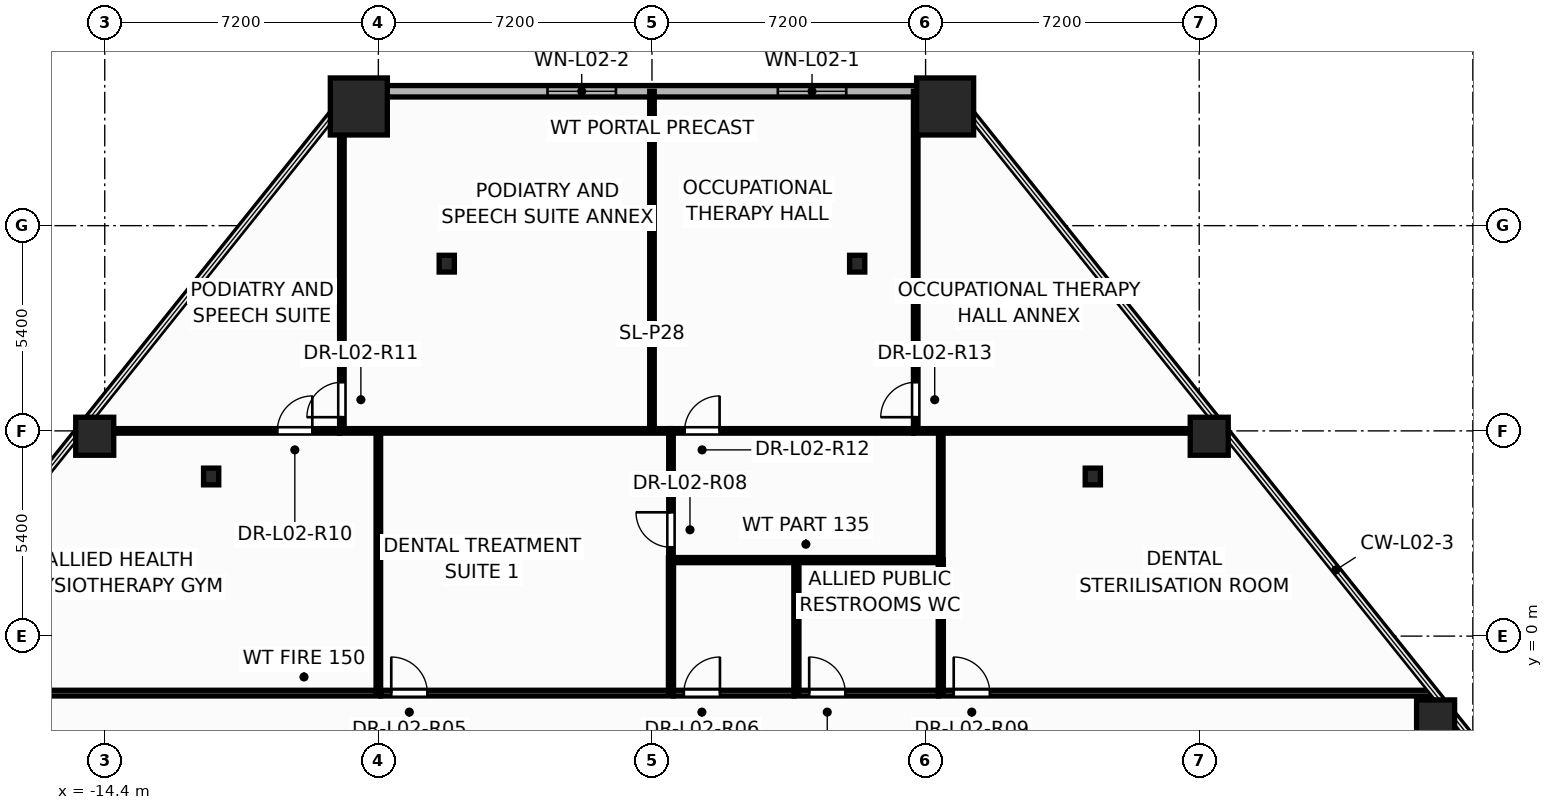
"""IFC4 building model, lengths in metres.
Left out: names, types, materials, properties, quantities, classifications, styles, units other than length and angle.
Written with IfcOpenShell. Run it as: python <this file> out.ifc"""

import sys

from ifc_helpers import new_model, si_unit, direction, frame, frame_2d, origin, origin_2d, place, context, subcontext, project, spatial, rectangle, hollow_rectangle, hollow_circle, i_section, extrude, element, fill, save


model = new_model("IFC4")
c1 = context("Model", 3, precision=1e-05, world=origin(), true_north=direction((0.0, 1.0)))
c2 = subcontext(c1, "Body", "Model", "MODEL_VIEW")
j1 = project(units=[si_unit("LENGTHUNIT", "METRE"), si_unit("PLANEANGLEUNIT", "RADIAN")], contexts=[c1])
p1 = place(None, origin())
s1 = spatial("IfcSite", under=j1, at=p1, CompositionType="ELEMENT")
p2 = place(p1, origin())
s2 = spatial("IfcBuilding", under=s1, at=p2, CompositionType="ELEMENT")
p3 = place(p2, frame((0.0, 0.0, 9.9)))
s3 = spatial("IfcBuildingStorey", under=s2, at=p3, CompositionType="ELEMENT", Elevation=9.9)
for number, where, z_axis, x_axis in (
    (1, (7.714, 13.936, 0.0), (0.0, 0.0, 1.0), (1.0, 0.0, 0.0)),
    (2, (-7.714, 13.936, 0.0), (0.0, 0.0, 1.0), (1.0, 0.0, 0.0)),
):
    element("IfcColumn", number, at=place(p3, frame(where, z_axis=z_axis, x_axis=x_axis)), inside=s3, PredefinedType="COLUMN", context=c2, shape_type="SweptSolid", body=[
        extrude(hollow_rectangle(XDim=1.5, YDim=1.5, WallThickness=0.075, at=origin_2d()), origin(), (0.0, 0.0, 1.0), 4.5),
    ])
for number, where, z_axis, x_axis in (
    (3, (20.62, -2.179, 0.0), (0.0, 0.0, 1.0), (1.0, 0.0, 0.0)),
    (4, (14.664, 5.259, 0.0), (0.0, 0.0, 1.0), (1.0, 0.0, 0.0)),
    (5, (-14.664, 5.259, 0.0), (0.0, 0.0, 1.0), (1.0, 0.0, 0.0)),
):
    element("IfcColumn", number, at=place(p3, frame(where, z_axis=z_axis, x_axis=x_axis)), inside=s3, PredefinedType="COLUMN", context=c2, shape_type="SweptSolid", body=[
        extrude(hollow_circle(Radius=0.5, WallThickness=0.045, at=origin_2d()), origin(), (0.0, 0.0, 1.0), 4.5),
    ])
for number, where, z_axis, x_axis in (
    (6, (-11.6, 4.2, 0.0), (0.0, 0.0, 1.0), (1.0, 0.0, 0.0)),
    (7, (11.6, 4.2, 0.0), (0.0, 0.0, 1.0), (1.0, 0.0, 0.0)),
    (8, (-5.4, 9.8, 0.0), (0.0, 0.0, 1.0), (1.0, 0.0, 0.0)),
    (9, (5.4, 9.8, 0.0), (0.0, 0.0, 1.0), (1.0, 0.0, 0.0)),
):
    element("IfcColumn", number, at=place(p3, frame(where, z_axis=z_axis, x_axis=x_axis)), inside=s3, PredefinedType="COLUMN", context=c2, shape_type="SweptSolid", body=[
        extrude(i_section(OverallWidth=0.4, OverallDepth=0.44, WebThickness=0.028, FlangeThickness=0.04, at=origin_2d()), origin(), (0.0, 0.0, 1.0), 4.5),
    ])
p4 = place(p3, frame((7.906, 14.336, -0.015), z_axis=(0.0, 0.0, 1.0), x_axis=(-1.0, 0.0, 0.0)))
e10 = element("IfcWall", 10, at=p4, inside=s3, PredefinedType="SOLIDWALL", context=c2, shape_type="SweptSolid", body=[
    extrude(rectangle(XDim=15.813, YDim=0.3, at=frame_2d((7.906, 0.0))), origin(), (0.0, 0.0, 1.0), 3.598),
])
p5 = place(p4, frame((2.795, 0.0, 0.9)))
e11 = element("IfcOpeningElement", 11, at=p5, cuts=e10, PredefinedType="OPENING", context=c2, shape_type="SweptSolid", body=[
    extrude(rectangle(XDim=1.806, YDim=1.804, at=frame_2d((0.9, 0.902))), frame((0.0, 0.16, 0.0), z_axis=(0.0, -1.0, 0.0), x_axis=(1.0, 0.0, 0.0)), (0.0, 0.0, 1.0), 0.32),
])
p6 = place(p4, frame((8.855, 0.0, 0.9)))
e12 = element("IfcOpeningElement", 12, at=p6, cuts=e10, PredefinedType="OPENING", context=c2, shape_type="SweptSolid", body=[
    extrude(rectangle(XDim=1.806, YDim=1.804, at=frame_2d((0.9, 0.902))), frame((0.0, 0.16, 0.0), z_axis=(0.0, -1.0, 0.0), x_axis=(1.0, 0.0, 0.0)), (0.0, 0.0, 1.0), 0.32),
])
p7 = place(p3, frame((-20.589, -1.5, 0.0), z_axis=(0.0, 0.0, 1.0), x_axis=(1.0, 0.0, 0.0)))
e13 = element("IfcWall", 13, at=p7, inside=s3, PredefinedType="PARTITIONING", context=c2, shape_type="SweptSolid", body=[
    extrude(rectangle(XDim=13.449, YDim=0.15, at=frame_2d((6.725, 0.0))), origin(), (0.0, 0.0, 1.0), 3.287),
])
p8 = place(p7, frame((2.22, 0.0, 0.0)))
e14 = element("IfcOpeningElement", 14, at=p8, cuts=e13, PredefinedType="OPENING", context=c2, shape_type="SweptSolid", body=[
    extrude(rectangle(XDim=0.956, YDim=2.104, at=frame_2d((0.475, 1.052))), frame((0.0, 0.085, 0.0), z_axis=(0.0, -1.0, 0.0), x_axis=(1.0, 0.0, 0.0)), (0.0, 0.0, 1.0), 0.17),
])
p9 = place(p3, frame((7.54, -1.5, 0.0), z_axis=(0.0, 0.0, 1.0), x_axis=(1.0, 0.0, 0.0)))
e15 = element("IfcWall", 15, at=p9, inside=s3, PredefinedType="PARTITIONING", context=c2, shape_type="SweptSolid", body=[
    extrude(rectangle(XDim=13.049, YDim=0.15, at=frame_2d((6.524, 0.0))), origin(), (0.0, 0.0, 1.0), 3.287),
])
p10 = place(p9, frame((0.4, 0.0, 0.0)))
e16 = element("IfcOpeningElement", 16, at=p10, cuts=e15, PredefinedType="OPENING", context=c2, shape_type="SweptSolid", body=[
    extrude(rectangle(XDim=0.956, YDim=2.104, at=frame_2d((0.475, 1.052))), frame((0.0, 0.085, 0.0), z_axis=(0.0, -1.0, 0.0), x_axis=(1.0, 0.0, 0.0)), (0.0, 0.0, 1.0), 0.17),
])
p11 = place(p3, frame((0.0, 5.4, 0.0), z_axis=(0.0, 0.0, 1.0), x_axis=(0.0, 1.0, 0.0)))
e17 = element("IfcWall", 17, at=p11, inside=s3, PredefinedType="PARTITIONING", context=c2, shape_type="SweptSolid", body=[
    extrude(rectangle(XDim=8.936, YDim=0.12, at=frame_2d((4.468, 0.0))), origin(), (0.0, 0.0, 1.0), 3.195),
])
p12 = place(p3, frame((6.94, 5.4, 0.0), z_axis=(0.0, 0.0, 1.0), x_axis=(0.0, 1.0, 0.0)))
e18 = element("IfcWall", 18, at=p12, inside=s3, PredefinedType="PARTITIONING", context=c2, shape_type="SweptSolid", body=[
    extrude(rectangle(XDim=8.936, YDim=0.12, at=frame_2d((4.468, 0.0))), origin(), (0.0, 0.0, 1.0), 3.195),
])
p13 = place(p12, frame((0.36, 0.0, 0.0)))
e19 = element("IfcOpeningElement", 19, at=p13, cuts=e18, PredefinedType="OPENING", context=c2, shape_type="SweptSolid", body=[
    extrude(rectangle(XDim=0.926, YDim=2.104, at=frame_2d((0.46, 1.052))), frame((0.0, 0.07, 0.0), z_axis=(0.0, -1.0, 0.0), x_axis=(1.0, 0.0, 0.0)), (0.0, 0.0, 1.0), 0.14),
])
p14 = place(p3, frame((-8.16, 5.4, 0.0), z_axis=(0.0, 0.0, 1.0), x_axis=(0.0, 1.0, 0.0)))
e20 = element("IfcWall", 20, at=p14, inside=s3, PredefinedType="PARTITIONING", context=c2, shape_type="SweptSolid", body=[
    extrude(rectangle(XDim=8.619, YDim=0.12, at=frame_2d((4.31, 0.0))), origin(), (0.0, 0.0, 1.0), 3.195),
])
p15 = place(p14, frame((0.36, 0.0, 0.0)))
e21 = element("IfcOpeningElement", 21, at=p15, cuts=e20, PredefinedType="OPENING", context=c2, shape_type="SweptSolid", body=[
    extrude(rectangle(XDim=0.926, YDim=2.104, at=frame_2d((0.46, 1.052))), frame((0.0, 0.07, 0.0), z_axis=(0.0, -1.0, 0.0), x_axis=(1.0, 0.0, 0.0)), (0.0, 0.0, 1.0), 0.14),
])
p16 = place(p3, frame((-7.138, -1.5, 0.0), z_axis=(0.0, 0.0, 1.0), x_axis=(1.0, 0.0, 0.0)))
e22 = element("IfcWall", 22, at=p16, inside=s3, PredefinedType="PARTITIONING", context=c2, shape_type="SweptSolid", body=[
    extrude(rectangle(XDim=7.698, YDim=0.15, at=frame_2d((3.849, 0.0))), origin(), (0.0, 0.0, 1.0), 4.22),
])
p17 = place(p16, frame((0.278, 0.0, 0.0)))
e23 = element("IfcOpeningElement", 23, at=p17, cuts=e22, PredefinedType="OPENING", context=c2, shape_type="SweptSolid", body=[
    extrude(rectangle(XDim=0.956, YDim=2.104, at=frame_2d((0.475, 1.052))), frame((0.0, 0.085, 0.0), z_axis=(0.0, -1.0, 0.0), x_axis=(1.0, 0.0, 0.0)), (0.0, 0.0, 1.0), 0.17),
])
p18 = place(p3, frame((6.88, 5.4, 0.0), z_axis=(0.0, 0.0, 1.0), x_axis=(1.0, 0.0, 0.0)))
e24 = element("IfcWall", 24, at=p18, inside=s3, PredefinedType="PARTITIONING", context=c2, shape_type="SweptSolid", body=[
    extrude(rectangle(XDim=8.183, YDim=0.12, at=frame_2d((4.092, 0.0))), origin(), (0.0, 0.0, 1.0), 3.195),
])
p19 = place(p3, frame((-8.22, 5.4, 0.0), z_axis=(0.0, 0.0, 1.0), x_axis=(1.0, 0.0, 0.0)))
e25 = element("IfcWall", 25, at=p19, inside=s3, PredefinedType="PARTITIONING", context=c2, shape_type="SweptSolid", body=[
    extrude(rectangle(XDim=8.72, YDim=0.12, at=frame_2d((4.36, 0.0))), origin(), (0.0, 0.0, 1.0), 4.22),
])
p20 = place(p3, frame((-15.063, 5.4, 0.0), z_axis=(0.0, 0.0, 1.0), x_axis=(1.0, 0.0, 0.0)))
e26 = element("IfcWall", 26, at=p20, inside=s3, PredefinedType="PARTITIONING", context=c2, shape_type="SweptSolid", body=[
    extrude(rectangle(XDim=6.841, YDim=0.12, at=frame_2d((3.42, 0.0))), origin(), (0.0, 0.0, 1.0), 3.195),
])
p21 = place(p20, frame((5.205, 0.0, 0.0)))
e27 = element("IfcOpeningElement", 27, at=p21, cuts=e26, PredefinedType="OPENING", context=c2, shape_type="SweptSolid", body=[
    extrude(rectangle(XDim=0.926, YDim=2.104, at=frame_2d((0.46, 1.052))), frame((0.0, 0.07, 0.0), z_axis=(0.0, -1.0, 0.0), x_axis=(1.0, 0.0, 0.0)), (0.0, 0.0, 1.0), 0.14),
])
p22 = place(p3, frame((-7.2, -1.5, 0.0), z_axis=(0.0, 0.0, 1.0), x_axis=(0.0, 1.0, 0.0)))
e28 = element("IfcWall", 28, at=p22, inside=s3, PredefinedType="PARTITIONING", context=c2, shape_type="SweptSolid", body=[
    extrude(rectangle(XDim=6.9, YDim=0.12, at=frame_2d((3.45, 0.0))), origin(), (0.0, 0.0, 1.0), 2.995),
])
p23 = place(p3, frame((0.5, 5.4, 0.0), z_axis=(0.0, 0.0, 1.0), x_axis=(1.0, 0.0, 0.0)))
e29 = element("IfcWall", 29, at=p23, inside=s3, PredefinedType="PARTITIONING", context=c2, shape_type="SweptSolid", body=[
    extrude(rectangle(XDim=6.378, YDim=0.12, at=frame_2d((3.189, 0.0))), origin(), (0.0, 0.0, 1.0), 4.22),
])
p24 = place(p23, frame((0.359, 0.0, 0.0)))
e30 = element("IfcOpeningElement", 30, at=p24, cuts=e29, PredefinedType="OPENING", context=c2, shape_type="SweptSolid", body=[
    extrude(rectangle(XDim=0.926, YDim=2.104, at=frame_2d((0.46, 1.052))), frame((0.0, 0.07, 0.0), z_axis=(0.0, -1.0, 0.0), x_axis=(1.0, 0.0, 0.0)), (0.0, 0.0, 1.0), 0.14),
])
p25 = place(p3, frame((3.74, -1.5, 0.0), z_axis=(0.0, 0.0, 1.0), x_axis=(1.0, 0.0, 0.0)))
e31 = element("IfcWall", 31, at=p25, inside=s3, PredefinedType="PARTITIONING", context=c2, shape_type="SweptSolid", body=[
    extrude(rectangle(XDim=3.798, YDim=0.15, at=frame_2d((1.899, 0.0))), origin(), (0.0, 0.0, 1.0), 4.22),
])
p26 = place(p25, frame((0.397, 0.0, 0.0)))
e32 = element("IfcOpeningElement", 32, at=p26, cuts=e31, PredefinedType="OPENING", context=c2, shape_type="SweptSolid", body=[
    extrude(rectangle(XDim=0.956, YDim=2.104, at=frame_2d((0.475, 1.052))), frame((0.0, 0.085, 0.0), z_axis=(0.0, -1.0, 0.0), x_axis=(1.0, 0.0, 0.0)), (0.0, 0.0, 1.0), 0.17),
])
p27 = place(p3, frame((0.5, 2.0, 0.0), z_axis=(0.0, 0.0, 1.0), x_axis=(1.0, 0.0, 0.0)))
e33 = element("IfcWall", 33, at=p27, inside=s3, PredefinedType="PARTITIONING", context=c2, shape_type="SweptSolid", body=[
    extrude(rectangle(XDim=7.1, YDim=0.135, at=frame_2d((3.55, 0.0))), origin(), (0.0, 0.0, 1.0), 4.22),
])
p28 = place(p3, frame((0.5, -1.5, 0.0), z_axis=(0.0, 0.0, 1.0), x_axis=(0.0, 1.0, 0.0)))
e34 = element("IfcWall", 34, at=p28, inside=s3, PredefinedType="PARTITIONING", context=c2, shape_type="SweptSolid", body=[
    extrude(rectangle(XDim=3.56, YDim=0.135, at=frame_2d((1.78, 0.0))), origin(), (0.0, 0.0, 1.0), 4.22),
])
for number, where, z_axis, x_axis in (
    (35, (3.8, -1.5, 0.0), (0.0, 0.0, 1.0), (0.0, 1.0, 0.0)),
    (36, (7.6, -1.5, 0.0), (0.0, 0.0, 1.0), (0.0, 1.0, 0.0)),
):
    element("IfcWall", number, at=place(p3, frame(where, z_axis=z_axis, x_axis=x_axis)), inside=s3, PredefinedType="PARTITIONING", context=c2, shape_type="SweptSolid", body=[
        extrude(rectangle(XDim=3.5, YDim=0.135, at=frame_2d((1.75, 0.0))), origin(), (0.0, 0.0, 1.0), 4.22),
    ])
p29 = place(p3, frame((0.5, 2.062, 0.0), z_axis=(0.0, 0.0, 1.0), x_axis=(0.0, 1.0, 0.0)))
e37 = element("IfcWall", 37, at=p29, inside=s3, PredefinedType="PARTITIONING", context=c2, shape_type="SweptSolid", body=[
    extrude(rectangle(XDim=3.338, YDim=0.12, at=frame_2d((1.669, 0.0))), origin(), (0.0, 0.0, 1.0), 2.995),
])
p30 = place(p29, frame((0.276, 0.0, 0.0)))
e38 = element("IfcOpeningElement", 38, at=p30, cuts=e37, PredefinedType="OPENING", context=c2, shape_type="SweptSolid", body=[
    extrude(rectangle(XDim=0.926, YDim=2.104, at=frame_2d((0.46, 1.052))), frame((0.0, 0.07, 0.0), z_axis=(0.0, -1.0, 0.0), x_axis=(1.0, 0.0, 0.0)), (0.0, 0.0, 1.0), 0.14),
])
p31 = place(p3, frame((0.562, -1.5, 0.0), z_axis=(0.0, 0.0, 1.0), x_axis=(1.0, 0.0, 0.0)))
e39 = element("IfcWall", 39, at=p31, inside=s3, PredefinedType="PARTITIONING", context=c2, shape_type="SweptSolid", body=[
    extrude(rectangle(XDim=3.176, YDim=0.15, at=frame_2d((1.588, 0.0))), origin(), (0.0, 0.0, 1.0), 4.22),
])
p32 = place(p31, frame((0.277, 0.0, 0.0)))
e40 = element("IfcOpeningElement", 40, at=p32, cuts=e39, PredefinedType="OPENING", context=c2, shape_type="SweptSolid", body=[
    extrude(rectangle(XDim=0.956, YDim=2.104, at=frame_2d((0.475, 1.052))), frame((0.0, 0.085, 0.0), z_axis=(0.0, -1.0, 0.0), x_axis=(1.0, 0.0, 0.0)), (0.0, 0.0, 1.0), 0.17),
])
p33 = place(p3, frame((7.6, 2.0, 0.0), z_axis=(0.0, 0.0, 1.0), x_axis=(0.0, 1.0, 0.0)))
e41 = element("IfcWall", 41, at=p33, inside=s3, PredefinedType="PARTITIONING", context=c2, shape_type="SweptSolid", body=[
    extrude(rectangle(XDim=3.4, YDim=0.12, at=frame_2d((1.7, 0.0))), origin(), (0.0, 0.0, 1.0), 2.995),
])
p34 = place(p5, origin())
e42 = element("IfcWindow", 42, at=p34, inside=s3, PartitioningType="SINGLE_PANEL", PredefinedType="WINDOW", context=c2, shape_type="SweptSolid", body=[
    extrude(rectangle(XDim=1.8, YDim=1.8, at=frame_2d((0.9, 0.9))), frame((0.0, 0.03, 0.0), z_axis=(0.0, -1.0, 0.0), x_axis=(1.0, 0.0, 0.0)), (0.0, 0.0, 1.0), 0.06),
])
fill(e11, e42)
p35 = place(p6, origin())
e43 = element("IfcWindow", 43, at=p35, inside=s3, PartitioningType="SINGLE_PANEL", PredefinedType="WINDOW", context=c2, shape_type="SweptSolid", body=[
    extrude(rectangle(XDim=1.8, YDim=1.8, at=frame_2d((0.9, 0.9))), frame((0.0, 0.03, 0.0), z_axis=(0.0, -1.0, 0.0), x_axis=(1.0, 0.0, 0.0)), (0.0, 0.0, 1.0), 0.06),
])
fill(e12, e43)
p36 = place(p17, origin())
e44 = element("IfcDoor", 44, at=p36, inside=s3, OperationType="SINGLE_SWING_LEFT", PredefinedType="DOOR", context=c2, shape_type="SweptSolid", body=[
    extrude(rectangle(XDim=0.95, YDim=2.1, at=frame_2d((0.475, 1.05))), frame((0.0, 0.025, 0.0), z_axis=(0.0, -1.0, 0.0), x_axis=(1.0, 0.0, 0.0)), (0.0, 0.0, 1.0), 0.05),
])
fill(e23, e44)
p37 = place(p32, origin())
e45 = element("IfcDoor", 45, at=p37, inside=s3, OperationType="SINGLE_SWING_RIGHT", PredefinedType="DOOR", context=c2, shape_type="SweptSolid", body=[
    extrude(rectangle(XDim=0.95, YDim=2.1, at=frame_2d((0.475, 1.05))), frame((0.0, 0.025, 0.0), z_axis=(0.0, -1.0, 0.0), x_axis=(1.0, 0.0, 0.0)), (0.0, 0.0, 1.0), 0.05),
])
fill(e40, e45)
p38 = place(p26, origin())
e46 = element("IfcDoor", 46, at=p38, inside=s3, OperationType="SINGLE_SWING_LEFT", PredefinedType="DOOR", context=c2, shape_type="SweptSolid", body=[
    extrude(rectangle(XDim=0.95, YDim=2.1, at=frame_2d((0.475, 1.05))), frame((0.0, 0.025, 0.0), z_axis=(0.0, -1.0, 0.0), x_axis=(1.0, 0.0, 0.0)), (0.0, 0.0, 1.0), 0.05),
])
fill(e32, e46)
p39 = place(p30, origin())
e47 = element("IfcDoor", 47, at=p39, inside=s3, OperationType="SINGLE_SWING_RIGHT", PredefinedType="DOOR", context=c2, shape_type="SweptSolid", body=[
    extrude(rectangle(XDim=0.92, YDim=2.1, at=frame_2d((0.46, 1.05))), frame((0.0, 0.025, 0.0), z_axis=(0.0, -1.0, 0.0), x_axis=(1.0, 0.0, 0.0)), (0.0, 0.0, 1.0), 0.05),
])
fill(e38, e47)
p40 = place(p10, origin())
e48 = element("IfcDoor", 48, at=p40, inside=s3, OperationType="SINGLE_SWING_LEFT", PredefinedType="DOOR", context=c2, shape_type="SweptSolid", body=[
    extrude(rectangle(XDim=0.95, YDim=2.1, at=frame_2d((0.475, 1.05))), frame((0.0, 0.025, 0.0), z_axis=(0.0, -1.0, 0.0), x_axis=(1.0, 0.0, 0.0)), (0.0, 0.0, 1.0), 0.05),
])
fill(e16, e48)
p41 = place(p21, origin())
e49 = element("IfcDoor", 49, at=p41, inside=s3, OperationType="SINGLE_SWING_RIGHT", PredefinedType="DOOR", context=c2, shape_type="SweptSolid", body=[
    extrude(rectangle(XDim=0.92, YDim=2.1, at=frame_2d((0.46, 1.05))), frame((0.0, 0.025, 0.0), z_axis=(0.0, -1.0, 0.0), x_axis=(1.0, 0.0, 0.0)), (0.0, 0.0, 1.0), 0.05),
])
fill(e27, e49)
p42 = place(p15, origin())
e50 = element("IfcDoor", 50, at=p42, inside=s3, OperationType="SINGLE_SWING_LEFT", PredefinedType="DOOR", context=c2, shape_type="SweptSolid", body=[
    extrude(rectangle(XDim=0.92, YDim=2.1, at=frame_2d((0.46, 1.05))), frame((0.0, 0.025, 0.0), z_axis=(0.0, -1.0, 0.0), x_axis=(1.0, 0.0, 0.0)), (0.0, 0.0, 1.0), 0.05),
])
fill(e21, e50)
p43 = place(p24, origin())
e51 = element("IfcDoor", 51, at=p43, inside=s3, OperationType="SINGLE_SWING_RIGHT", PredefinedType="DOOR", context=c2, shape_type="SweptSolid", body=[
    extrude(rectangle(XDim=0.92, YDim=2.1, at=frame_2d((0.46, 1.05))), frame((0.0, 0.025, 0.0), z_axis=(0.0, -1.0, 0.0), x_axis=(1.0, 0.0, 0.0)), (0.0, 0.0, 1.0), 0.05),
])
fill(e30, e51)
p44 = place(p13, origin())
e52 = element("IfcDoor", 52, at=p44, inside=s3, OperationType="SINGLE_SWING_LEFT", PredefinedType="DOOR", context=c2, shape_type="SweptSolid", body=[
    extrude(rectangle(XDim=0.92, YDim=2.1, at=frame_2d((0.46, 1.05))), frame((0.0, 0.025, 0.0), z_axis=(0.0, -1.0, 0.0), x_axis=(1.0, 0.0, 0.0)), (0.0, 0.0, 1.0), 0.05),
])
fill(e19, e52)
save(model, sys.argv[1])
